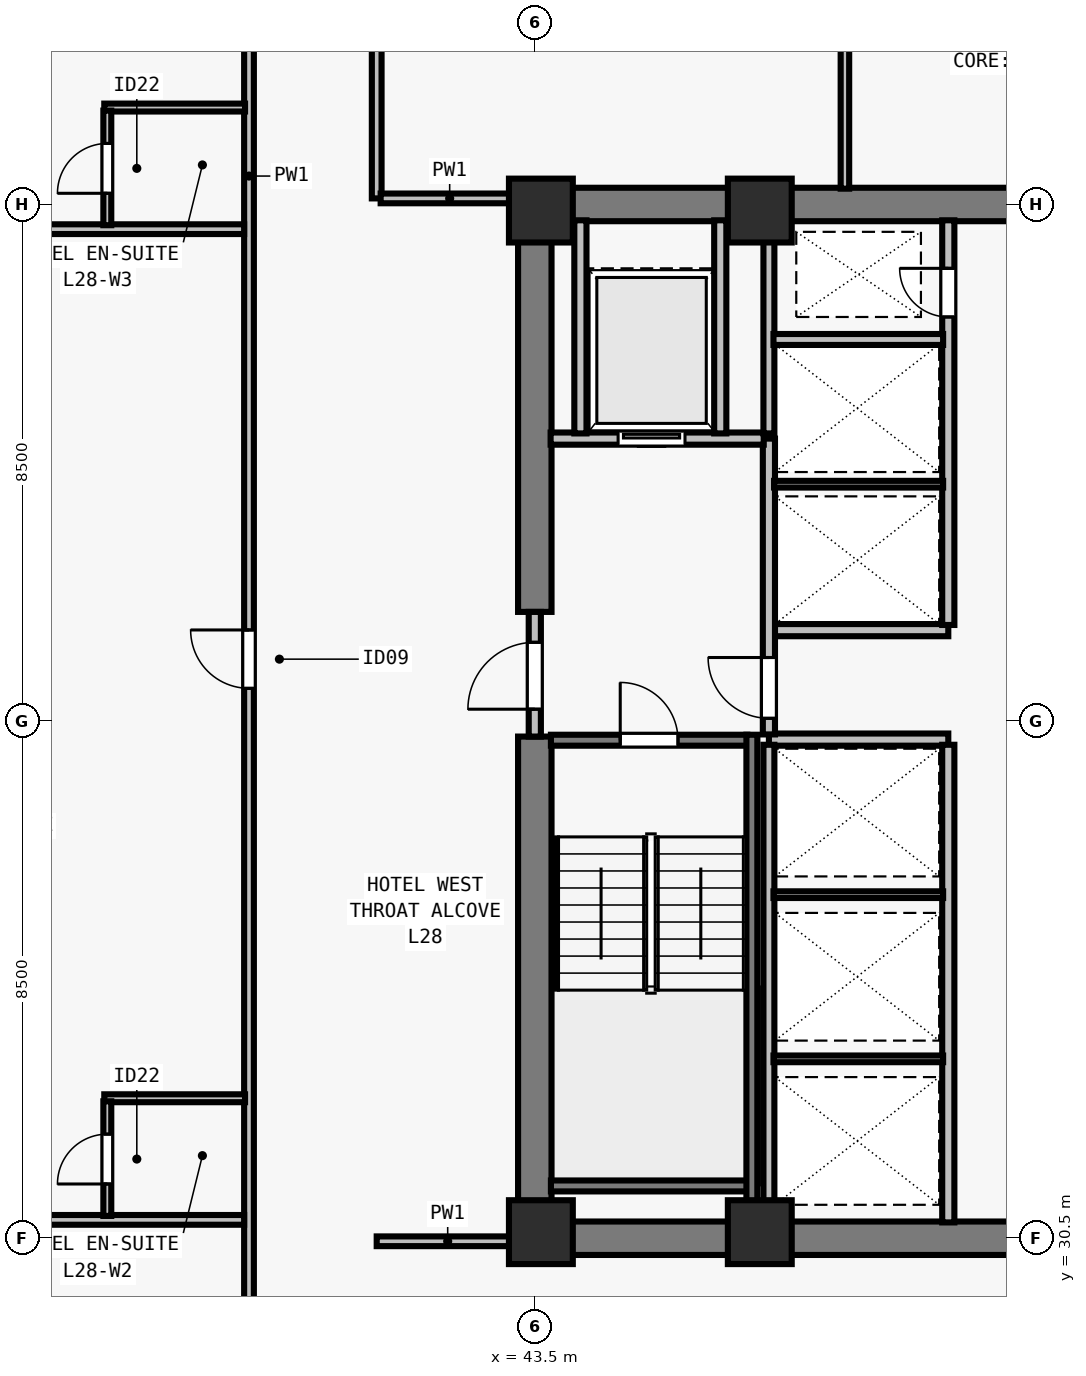
"""IFC4 building model, lengths in metres.
Left out: names, types, materials, properties, quantities, classifications, styles, units other than length and angle.
Written with IfcOpenShell. Run it as: python <this file> out.ifc"""

import sys

from ifc_helpers import new_model, si_unit, direction, frame, frame_2d, origin, origin_2d, place, context, subcontext, project, spatial, rectangle, extrude, element, fill, save


model = new_model("IFC4")
c1 = context("Model", 3, precision=1e-05, world=origin(), true_north=direction((0.0, 1.0)))
c2 = subcontext(c1, "Body", "Model", "MODEL_VIEW")
j1 = project(units=[si_unit("LENGTHUNIT", "METRE"), si_unit("PLANEANGLEUNIT", "RADIAN")], contexts=[c1])
p1 = place(None, origin())
s1 = spatial("IfcSite", under=j1, at=p1, CompositionType="ELEMENT")
p2 = place(p1, origin())
s2 = spatial("IfcBuilding", under=s1, at=p2, CompositionType="ELEMENT")
p3 = place(p2, frame((0.0, 0.0, 106.0)))
s3 = spatial("IfcBuildingStorey", under=s2, at=p3, CompositionType="ELEMENT", Elevation=106.0)
for number, where, z_axis, x_axis in (
    (1, (43.6, 30.6, 0.0), (0.0, 0.0, 1.0), (1.0, 0.0, 0.0)),
    (2, (47.2, 30.6, 0.0), (0.0, 0.0, 1.0), (1.0, 0.0, 0.0)),
    (3, (43.6, 47.4, 0.0), (0.0, 0.0, 1.0), (1.0, 0.0, 0.0)),
    (4, (47.2, 47.4, 0.0), (0.0, 0.0, 1.0), (1.0, 0.0, 0.0)),
):
    element("IfcColumn", number, at=place(p3, frame(where, z_axis=z_axis, x_axis=x_axis)), inside=s3, PredefinedType="COLUMN", context=c2, shape_type="SweptSolid", body=[
        extrude(rectangle(XDim=1.05, YDim=1.05, at=origin_2d()), origin(), (0.0, 0.0, 1.0), 3.5),
    ])
for number, where, z_axis, x_axis in (
    (5, (43.225, 30.5, 0.0), (0.0, 0.0, 1.0), (1.0, 0.0, 0.0)),
    (6, (43.225, 47.5, 0.0), (0.0, 0.0, 1.0), (1.0, 0.0, 0.0)),
):
    element("IfcWall", number, at=place(p3, frame(where, z_axis=z_axis, x_axis=x_axis)), inside=s3, PredefinedType="SHEAR", context=c2, shape_type="SweptSolid", body=[
        extrude(rectangle(XDim=17.55, YDim=0.55, at=frame_2d((8.775, 0.0))), origin(), (0.0, 0.0, 1.0), 3.28),
    ])
p4 = place(p3, frame((43.5, 30.765, 0.0), z_axis=(0.0, 0.0, 1.0), x_axis=(0.0, 1.0, 0.0)))
e7 = element("IfcWall", 7, at=p4, inside=s3, PredefinedType="SHEAR", context=c2, shape_type="SweptSolid", body=[
    extrude(rectangle(XDim=7.985, YDim=0.55, at=frame_2d((3.993, 0.0))), origin(), (0.0, 0.0, 1.0), 3.28),
])
p5 = place(p3, frame((43.5, 40.8, 0.0), z_axis=(0.0, 0.0, 1.0), x_axis=(0.0, 1.0, 0.0)))
e8 = element("IfcWall", 8, at=p5, inside=s3, PredefinedType="SHEAR", context=c2, shape_type="SweptSolid", body=[
    extrude(rectangle(XDim=6.435, YDim=0.55, at=frame_2d((3.218, 0.0))), origin(), (0.0, 0.0, 1.0), 3.28),
])
for number, where, z_axis, x_axis in (
    (9, (47.35, 38.7, 0.0), (0.0, 0.0, 1.0), (1.0, 0.0, 0.0)),
    (10, (47.35, 40.5, 0.0), (0.0, 0.0, 1.0), (1.0, 0.0, 0.0)),
):
    element("IfcWall", number, at=place(p3, frame(where, z_axis=z_axis, x_axis=x_axis)), inside=s3, PredefinedType="SOLIDWALL", context=c2, shape_type="SweptSolid", body=[
        extrude(rectangle(XDim=2.95, YDim=0.2, at=frame_2d((1.475, 0.0))), origin(), (0.0, 0.0, 1.0), 3.28),
    ])
p6 = place(p3, frame((50.3, 30.76, 0.0), z_axis=(0.0, 0.0, 1.0), x_axis=(0.0, 1.0, 0.0)))
e11 = element("IfcWall", 11, at=p6, inside=s3, PredefinedType="SOLIDWALL", context=c2, shape_type="SweptSolid", body=[
    extrude(rectangle(XDim=7.855, YDim=0.2, at=frame_2d((3.927, 0.0))), origin(), (0.0, 0.0, 1.0), 3.28),
])
p7 = place(p3, frame((50.3, 40.585, 0.0), z_axis=(0.0, 0.0, 1.0), x_axis=(0.0, 1.0, 0.0)))
e12 = element("IfcWall", 12, at=p7, inside=s3, PredefinedType="SOLIDWALL", context=c2, shape_type="SweptSolid", body=[
    extrude(rectangle(XDim=6.655, YDim=0.2, at=frame_2d((3.328, 0.0))), origin(), (0.0, 0.0, 1.0), 3.28),
])
p8 = place(p7, frame((5.065, 0.0, 0.0)))
e13 = element("IfcOpeningElement", 13, at=p8, cuts=e12, PredefinedType="OPENING", context=c2, shape_type="SweptSolid", body=[
    extrude(rectangle(XDim=0.8, YDim=2.08, at=frame_2d((0.4, 1.04))), frame((0.0, 0.11, 0.0), z_axis=(0.0, -1.0, 0.0), x_axis=(1.0, 0.0, 0.0)), (0.0, 0.0, 1.0), 0.22),
])
p9 = place(p3, frame((43.5, 38.75, 0.0), z_axis=(0.0, 0.0, 1.0), x_axis=(0.0, 1.0, 0.0)))
e14 = element("IfcWall", 14, at=p9, inside=s3, PredefinedType="SOLIDWALL", context=c2, shape_type="SweptSolid", body=[
    extrude(rectangle(XDim=2.05, YDim=0.2, at=frame_2d((1.025, 0.0))), origin(), (0.0, 0.0, 1.0), 3.28),
])
p10 = place(p9, frame((0.45, 0.0, 0.0)))
e15 = element("IfcOpeningElement", 15, at=p10, cuts=e14, PredefinedType="OPENING", context=c2, shape_type="SweptSolid", body=[
    extrude(rectangle(XDim=1.1, YDim=2.15, at=frame_2d((0.55, 1.075))), frame((0.0, 0.11, 0.0), z_axis=(0.0, -1.0, 0.0), x_axis=(1.0, 0.0, 0.0)), (0.0, 0.0, 1.0), 0.22),
])
p11 = place(p3, frame((47.35, 38.785, 0.0), z_axis=(0.0, 0.0, 1.0), x_axis=(0.0, 1.0, 0.0)))
e16 = element("IfcWall", 16, at=p11, inside=s3, PredefinedType="SOLIDWALL", context=c2, shape_type="SweptSolid", body=[
    extrude(rectangle(XDim=4.865, YDim=0.2, at=frame_2d((2.433, 0.0))), origin(), (0.0, 0.0, 1.0), 3.28),
])
p12 = place(p11, frame((0.265, 0.0, 0.0)))
e17 = element("IfcOpeningElement", 17, at=p12, cuts=e16, PredefinedType="OPENING", context=c2, shape_type="SweptSolid", body=[
    extrude(rectangle(XDim=1.0, YDim=2.15, at=frame_2d((0.5, 1.075))), frame((0.0, 0.11, 0.0), z_axis=(0.0, -1.0, 0.0), x_axis=(1.0, 0.0, 0.0)), (0.0, 0.0, 1.0), 0.22),
])
p13 = place(p3, frame((43.76, 43.65, 0.0), z_axis=(0.0, 0.0, 1.0), x_axis=(1.0, 0.0, 0.0)))
e18 = element("IfcWall", 18, at=p13, inside=s3, PredefinedType="SOLIDWALL", context=c2, shape_type="SweptSolid", body=[
    extrude(rectangle(XDim=3.505, YDim=0.2, at=frame_2d((1.752, 0.0))), origin(), (0.0, 0.0, 1.0), 3.28),
])
p14 = place(p13, frame((1.11, 0.0, 0.0)))
e19 = element("IfcOpeningElement", 19, at=p14, cuts=e18, PredefinedType="OPENING", context=c2, shape_type="SweptSolid", body=[
    extrude(rectangle(XDim=1.1, YDim=2.2, at=frame_2d((0.55, 1.1))), frame((0.0, 0.11, 0.0), z_axis=(0.0, -1.0, 0.0), x_axis=(1.0, 0.0, 0.0)), (0.0, 0.0, 1.0), 0.22),
])
for number, where, z_axis, x_axis in (
    (20, (46.55, 43.735, 0.0), (0.0, 0.0, 1.0), (0.0, 1.0, 0.0)),
    (21, (44.25, 43.735, 0.0), (0.0, 0.0, 1.0), (0.0, 1.0, 0.0)),
):
    element("IfcWall", number, at=place(p3, frame(where, z_axis=z_axis, x_axis=x_axis)), inside=s3, PredefinedType="SOLIDWALL", context=c2, shape_type="SweptSolid", body=[
        extrude(rectangle(XDim=3.505, YDim=0.2, at=frame_2d((1.752, 0.0))), origin(), (0.0, 0.0, 1.0), 3.28),
    ])
p15 = place(p3, frame((47.35, 30.76, 0.0), z_axis=(0.0, 0.0, 1.0), x_axis=(0.0, 1.0, 0.0)))
e22 = element("IfcWall", 22, at=p15, inside=s3, PredefinedType="SOLIDWALL", context=c2, shape_type="SweptSolid", body=[
    extrude(rectangle(XDim=7.855, YDim=0.18, at=frame_2d((3.927, 0.0))), origin(), (0.0, 0.0, 1.0), 3.28),
])
for number, where, z_axis, x_axis in (
    (23, (47.425, 33.45, 0.0), (0.0, 0.0, 1.0), (1.0, 0.0, 0.0)),
    (24, (47.425, 36.15, 0.0), (0.0, 0.0, 1.0), (1.0, 0.0, 0.0)),
):
    element("IfcWall", number, at=place(p3, frame(where, z_axis=z_axis, x_axis=x_axis)), inside=s3, PredefinedType="PARTITIONING", context=c2, shape_type="SweptSolid", body=[
        extrude(rectangle(XDim=2.79, YDim=0.11, at=frame_2d((1.395, 0.0))), origin(), (0.0, 0.0, 1.0), 3.28),
    ])
p16 = place(p3, frame((47.35, 43.735, 0.0), z_axis=(0.0, 0.0, 1.0), x_axis=(0.0, 1.0, 0.0)))
e25 = element("IfcWall", 25, at=p16, inside=s3, PredefinedType="SOLIDWALL", context=c2, shape_type="SweptSolid", body=[
    extrude(rectangle(XDim=3.505, YDim=0.18, at=frame_2d((1.752, 0.0))), origin(), (0.0, 0.0, 1.0), 3.28),
])
p17 = place(p3, frame((47.435, 42.9, 0.0), z_axis=(0.0, 0.0, 1.0), x_axis=(1.0, 0.0, 0.0)))
e26 = element("IfcWall", 26, at=p17, inside=s3, PredefinedType="PARTITIONING", context=c2, shape_type="SweptSolid", body=[
    extrude(rectangle(XDim=2.78, YDim=0.11, at=frame_2d((1.39, 0.0))), origin(), (0.0, 0.0, 1.0), 3.28),
])
p18 = place(p3, frame((47.425, 45.28, 0.0), z_axis=(0.0, 0.0, 1.0), x_axis=(1.0, 0.0, 0.0)))
e27 = element("IfcWall", 27, at=p18, inside=s3, PredefinedType="SOLIDWALL", context=c2, shape_type="SweptSolid", body=[
    extrude(rectangle(XDim=2.79, YDim=0.18, at=frame_2d((1.395, 0.0))), origin(), (0.0, 0.0, 1.0), 3.28),
])
p19 = place(p3, frame((38.8, 15.325, 0.0), z_axis=(0.0, 0.0, 1.0), x_axis=(0.0, 1.0, 0.0)))
e28 = element("IfcWall", 28, at=p19, inside=s3, PredefinedType="PARTITIONING", context=c2, shape_type="SweptSolid", body=[
    extrude(rectangle(XDim=47.35, YDim=0.16, at=frame_2d((23.675, 0.0))), origin(), (0.0, 0.0, 1.0), 2.555),
])
p20 = place(p19, frame((8.606, 0.0, 0.0)))
e29 = element("IfcOpeningElement", 29, at=p20, cuts=e28, PredefinedType="OPENING", context=c2, shape_type="SweptSolid", body=[
    extrude(rectangle(XDim=0.96, YDim=2.15, at=frame_2d((0.48, 1.075))), frame((0.0, 0.09, 0.0), z_axis=(0.0, -1.0, 0.0), x_axis=(1.0, 0.0, 0.0)), (0.0, 0.0, 1.0), 0.18),
])
p21 = place(p19, frame((24.218, 0.0, 0.0)))
e30 = element("IfcOpeningElement", 30, at=p21, cuts=e28, PredefinedType="OPENING", context=c2, shape_type="SweptSolid", body=[
    extrude(rectangle(XDim=0.96, YDim=2.15, at=frame_2d((0.48, 1.075))), frame((0.0, 0.09, 0.0), z_axis=(0.0, -1.0, 0.0), x_axis=(1.0, 0.0, 0.0)), (0.0, 0.0, 1.0), 0.18),
])
p22 = place(p19, frame((40.107, 0.0, 0.0)))
e31 = element("IfcOpeningElement", 31, at=p22, cuts=e28, PredefinedType="OPENING", context=c2, shape_type="SweptSolid", body=[
    extrude(rectangle(XDim=0.96, YDim=2.15, at=frame_2d((0.48, 1.075))), frame((0.0, 0.09, 0.0), z_axis=(0.0, -1.0, 0.0), x_axis=(1.0, 0.0, 0.0)), (0.0, 0.0, 1.0), 0.18),
])
p23 = place(p3, frame((40.9, 47.6, 0.0), z_axis=(0.0, 0.0, 1.0), x_axis=(0.0, 1.0, 0.0)))
e32 = element("IfcWall", 32, at=p23, inside=s3, PredefinedType="PARTITIONING", context=c2, shape_type="SweptSolid", body=[
    extrude(rectangle(XDim=14.985, YDim=0.16, at=frame_2d((7.492, 0.0))), origin(), (0.0, 0.0, 1.0), 2.555),
])
p24 = place(p23, frame((3.5, 0.0, 0.0)))
e33 = element("IfcOpeningElement", 33, at=p24, cuts=e32, PredefinedType="OPENING", context=c2, shape_type="SweptSolid", body=[
    extrude(rectangle(XDim=0.96, YDim=2.12, at=frame_2d((0.48, 1.06))), frame((0.0, 0.09, 0.0), z_axis=(0.0, -1.0, 0.0), x_axis=(1.0, 0.0, 0.0)), (0.0, 0.0, 1.0), 0.18),
])
p25 = place(p3, frame((40.9, 30.45, 0.0), z_axis=(0.0, 0.0, 1.0), x_axis=(1.0, 0.0, 0.0)))
e34 = element("IfcWall", 34, at=p25, inside=s3, PredefinedType="PARTITIONING", context=c2, shape_type="SweptSolid", body=[
    extrude(rectangle(XDim=2.335, YDim=0.16, at=frame_2d((1.167, 0.0))), origin(), (0.0, 0.0, 1.0), 3.28),
])
p26 = place(p3, frame((40.965, 47.6, 0.0), z_axis=(0.0, 0.0, 1.0), x_axis=(1.0, 0.0, 0.0)))
e35 = element("IfcWall", 35, at=p26, inside=s3, PredefinedType="PARTITIONING", context=c2, shape_type="SweptSolid", body=[
    extrude(rectangle(XDim=2.27, YDim=0.16, at=frame_2d((1.135, 0.0))), origin(), (0.0, 0.0, 1.0), 3.28),
])
p27 = place(p3, frame((48.6, 47.76, 0.0), z_axis=(0.0, 0.0, 1.0), x_axis=(0.0, 1.0, 0.0)))
e36 = element("IfcWall", 36, at=p27, inside=s3, PredefinedType="PARTITIONING", context=c2, shape_type="SweptSolid", body=[
    extrude(rectangle(XDim=14.915, YDim=0.14, at=frame_2d((7.458, 0.0))), origin(), (0.0, 0.0, 1.0), 2.896),
])
p28 = place(p27, frame((2.34, 0.0, 0.0)))
e37 = element("IfcOpeningElement", 37, at=p28, cuts=e36, PredefinedType="OPENING", context=c2, shape_type="SweptSolid", body=[
    extrude(rectangle(XDim=0.96, YDim=2.12, at=frame_2d((0.48, 1.06))), frame((0.0, 0.08, 0.0), z_axis=(0.0, -1.0, 0.0), x_axis=(1.0, 0.0, 0.0)), (0.0, 0.0, 1.0), 0.16),
])
p29 = place(p3, frame((28.325, 30.802, 0.0), z_axis=(0.0, 0.0, 1.0), x_axis=(1.0, 0.0, 0.0)))
e38 = element("IfcWall", 38, at=p29, inside=s3, PredefinedType="PARTITIONING", context=c2, shape_type="SweptSolid", body=[
    extrude(rectangle(XDim=10.395, YDim=0.16, at=frame_2d((5.198, 0.0))), origin(), (0.0, 0.0, 1.0), 3.28),
])
p30 = place(p3, frame((36.42, 32.802, 0.0), z_axis=(0.0, 0.0, 1.0), x_axis=(1.0, 0.0, 0.0)))
e39 = element("IfcWall", 39, at=p30, inside=s3, PredefinedType="PLUMBINGWALL", context=c2, shape_type="SweptSolid", body=[
    extrude(rectangle(XDim=2.315, YDim=0.13, at=frame_2d((1.158, 0.0))), origin(), (0.0, 0.0, 1.0), 3.28),
])
p31 = place(p3, frame((36.47, 30.867, 0.0), z_axis=(0.0, 0.0, 1.0), x_axis=(0.0, 1.0, 0.0)))
e40 = element("IfcWall", 40, at=p31, inside=s3, PredefinedType="PLUMBINGWALL", context=c2, shape_type="SweptSolid", body=[
    extrude(rectangle(XDim=1.885, YDim=0.13, at=frame_2d((0.942, 0.0))), origin(), (0.0, 0.0, 1.0), 3.28),
])
p32 = place(p31, frame((0.525, 0.0, 0.0)))
e41 = element("IfcOpeningElement", 41, at=p32, cuts=e40, PredefinedType="OPENING", context=c2, shape_type="SweptSolid", body=[
    extrude(rectangle(XDim=0.82, YDim=2.1, at=frame_2d((0.41, 1.05))), frame((0.0, 0.075, 0.0), z_axis=(0.0, -1.0, 0.0), x_axis=(1.0, 0.0, 0.0)), (0.0, 0.0, 1.0), 0.15),
])
p33 = place(p3, frame((28.325, 47.094, 0.0), z_axis=(0.0, 0.0, 1.0), x_axis=(1.0, 0.0, 0.0)))
e42 = element("IfcWall", 42, at=p33, inside=s3, PredefinedType="PARTITIONING", context=c2, shape_type="SweptSolid", body=[
    extrude(rectangle(XDim=10.395, YDim=0.16, at=frame_2d((5.198, 0.0))), origin(), (0.0, 0.0, 1.0), 3.28),
])
p34 = place(p3, frame((36.42, 49.094, 0.0), z_axis=(0.0, 0.0, 1.0), x_axis=(1.0, 0.0, 0.0)))
e43 = element("IfcWall", 43, at=p34, inside=s3, PredefinedType="PLUMBINGWALL", context=c2, shape_type="SweptSolid", body=[
    extrude(rectangle(XDim=2.315, YDim=0.13, at=frame_2d((1.158, 0.0))), origin(), (0.0, 0.0, 1.0), 3.28),
])
p35 = place(p3, frame((36.47, 47.159, 0.0), z_axis=(0.0, 0.0, 1.0), x_axis=(0.0, 1.0, 0.0)))
e44 = element("IfcWall", 44, at=p35, inside=s3, PredefinedType="PLUMBINGWALL", context=c2, shape_type="SweptSolid", body=[
    extrude(rectangle(XDim=1.885, YDim=0.13, at=frame_2d((0.942, 0.0))), origin(), (0.0, 0.0, 1.0), 3.28),
])
p36 = place(p35, frame((0.525, 0.0, 0.0)))
e45 = element("IfcOpeningElement", 45, at=p36, cuts=e44, PredefinedType="OPENING", context=c2, shape_type="SweptSolid", body=[
    extrude(rectangle(XDim=0.82, YDim=2.1, at=frame_2d((0.41, 1.05))), frame((0.0, 0.075, 0.0), z_axis=(0.0, -1.0, 0.0), x_axis=(1.0, 0.0, 0.0)), (0.0, 0.0, 1.0), 0.15),
])
p37 = place(p3, frame((43.765, 38.69, 0.0), z_axis=(0.0, 0.0, 1.0), x_axis=(1.0, 0.0, 0.0)))
e46 = element("IfcWall", 46, at=p37, inside=s3, PredefinedType="SOLIDWALL", context=c2, shape_type="SweptSolid", body=[
    extrude(rectangle(XDim=3.23, YDim=0.18, at=frame_2d((1.615, 0.0))), origin(), (0.0, 0.0, 1.0), 3.28),
])
p38 = place(p37, frame((1.14, 0.0, 0.0)))
e47 = element("IfcOpeningElement", 47, at=p38, cuts=e46, PredefinedType="OPENING", context=c2, shape_type="SweptSolid", body=[
    extrude(rectangle(XDim=0.95, YDim=2.15, at=frame_2d((0.475, 1.075))), frame((0.0, 0.1, 0.0), z_axis=(0.0, -1.0, 0.0), x_axis=(1.0, 0.0, 0.0)), (0.0, 0.0, 1.0), 0.2),
])
p39 = place(p3, frame((43.765, 31.36, 0.0), z_axis=(0.0, 0.0, 1.0), x_axis=(1.0, 0.0, 0.0)))
e48 = element("IfcWall", 48, at=p39, inside=s3, PredefinedType="SOLIDWALL", context=c2, shape_type="SweptSolid", body=[
    extrude(rectangle(XDim=3.23, YDim=0.18, at=frame_2d((1.615, 0.0))), origin(), (0.0, 0.0, 1.0), 3.28),
])
p40 = place(p3, frame((47.07, 38.78, 0.0), z_axis=(0.0, 0.0, 1.0), x_axis=(0.0, -1.0, 0.0)))
e49 = element("IfcWall", 49, at=p40, inside=s3, PredefinedType="SOLIDWALL", context=c2, shape_type="SweptSolid", body=[
    extrude(rectangle(XDim=8.017, YDim=0.18, at=frame_2d((4.009, 0.0))), origin(), (0.0, 0.0, 1.0), 3.28),
])
p41 = place(p10, origin())
e50 = element("IfcDoor", 50, at=p41, inside=s3, OperationType="SINGLE_SWING_LEFT", PredefinedType="DOOR", context=c2, shape_type="SweptSolid", body=[
    extrude(rectangle(XDim=1.1, YDim=2.15, at=frame_2d((0.55, 1.075))), frame((0.0, 0.025, 0.0), z_axis=(0.0, -1.0, 0.0), x_axis=(1.0, 0.0, 0.0)), (0.0, 0.0, 1.0), 0.05),
])
fill(e15, e50)
p42 = place(p12, origin())
e51 = element("IfcDoor", 51, at=p42, inside=s3, OperationType="SINGLE_SWING_RIGHT", PredefinedType="DOOR", context=c2, shape_type="SweptSolid", body=[
    extrude(rectangle(XDim=1.0, YDim=2.15, at=frame_2d((0.5, 1.075))), frame((0.0, 0.025, 0.0), z_axis=(0.0, -1.0, 0.0), x_axis=(1.0, 0.0, 0.0)), (0.0, 0.0, 1.0), 0.05),
])
fill(e17, e51)
p43 = place(p14, origin())
e52 = element("IfcDoor", 52, at=p43, inside=s3, OperationType="SLIDING_TO_LEFT", PredefinedType="DOOR", context=c2, shape_type="SweptSolid", body=[
    extrude(rectangle(XDim=1.1, YDim=2.2, at=frame_2d((0.55, 1.1))), frame((0.0, 0.025, 0.0), z_axis=(0.0, -1.0, 0.0), x_axis=(1.0, 0.0, 0.0)), (0.0, 0.0, 1.0), 0.05),
])
fill(e19, e52)
p44 = place(p8, origin())
e53 = element("IfcDoor", 53, at=p44, inside=s3, OperationType="SINGLE_SWING_RIGHT", PredefinedType="DOOR", context=c2, shape_type="SweptSolid", body=[
    extrude(rectangle(XDim=0.8, YDim=2.08, at=frame_2d((0.4, 1.04))), frame((0.0, 0.025, 0.0), z_axis=(0.0, -1.0, 0.0), x_axis=(1.0, 0.0, 0.0)), (0.0, 0.0, 1.0), 0.05),
])
fill(e13, e53)
p45 = place(p32, origin())
e54 = element("IfcDoor", 54, at=p45, inside=s3, OperationType="SINGLE_SWING_LEFT", PredefinedType="DOOR", context=c2, shape_type="SweptSolid", body=[
    extrude(rectangle(XDim=0.82, YDim=2.1, at=frame_2d((0.41, 1.05))), frame((0.0, 0.025, 0.0), z_axis=(0.0, -1.0, 0.0), x_axis=(1.0, 0.0, 0.0)), (0.0, 0.0, 1.0), 0.05),
])
fill(e41, e54)
p46 = place(p21, origin())
e55 = element("IfcDoor", 55, at=p46, inside=s3, OperationType="SINGLE_SWING_RIGHT", PredefinedType="DOOR", context=c2, shape_type="SweptSolid", body=[
    extrude(rectangle(XDim=0.96, YDim=2.15, at=frame_2d((0.48, 1.075))), frame((0.0, 0.025, 0.0), z_axis=(0.0, -1.0, 0.0), x_axis=(1.0, 0.0, 0.0)), (0.0, 0.0, 1.0), 0.05),
])
fill(e30, e55)
p47 = place(p36, origin())
e56 = element("IfcDoor", 56, at=p47, inside=s3, OperationType="SINGLE_SWING_LEFT", PredefinedType="DOOR", context=c2, shape_type="SweptSolid", body=[
    extrude(rectangle(XDim=0.82, YDim=2.1, at=frame_2d((0.41, 1.05))), frame((0.0, 0.025, 0.0), z_axis=(0.0, -1.0, 0.0), x_axis=(1.0, 0.0, 0.0)), (0.0, 0.0, 1.0), 0.05),
])
fill(e45, e56)
p48 = place(p38, origin())
e57 = element("IfcDoor", 57, at=p48, inside=s3, OperationType="SINGLE_SWING_LEFT", PredefinedType="DOOR", context=c2, shape_type="SweptSolid", body=[
    extrude(rectangle(XDim=0.95, YDim=2.15, at=frame_2d((0.475, 1.075))), frame((0.0, 0.025, 0.0), z_axis=(0.0, -1.0, 0.0), x_axis=(1.0, 0.0, 0.0)), (0.0, 0.0, 1.0), 0.05),
])
fill(e47, e57)
save(model, sys.argv[1])
